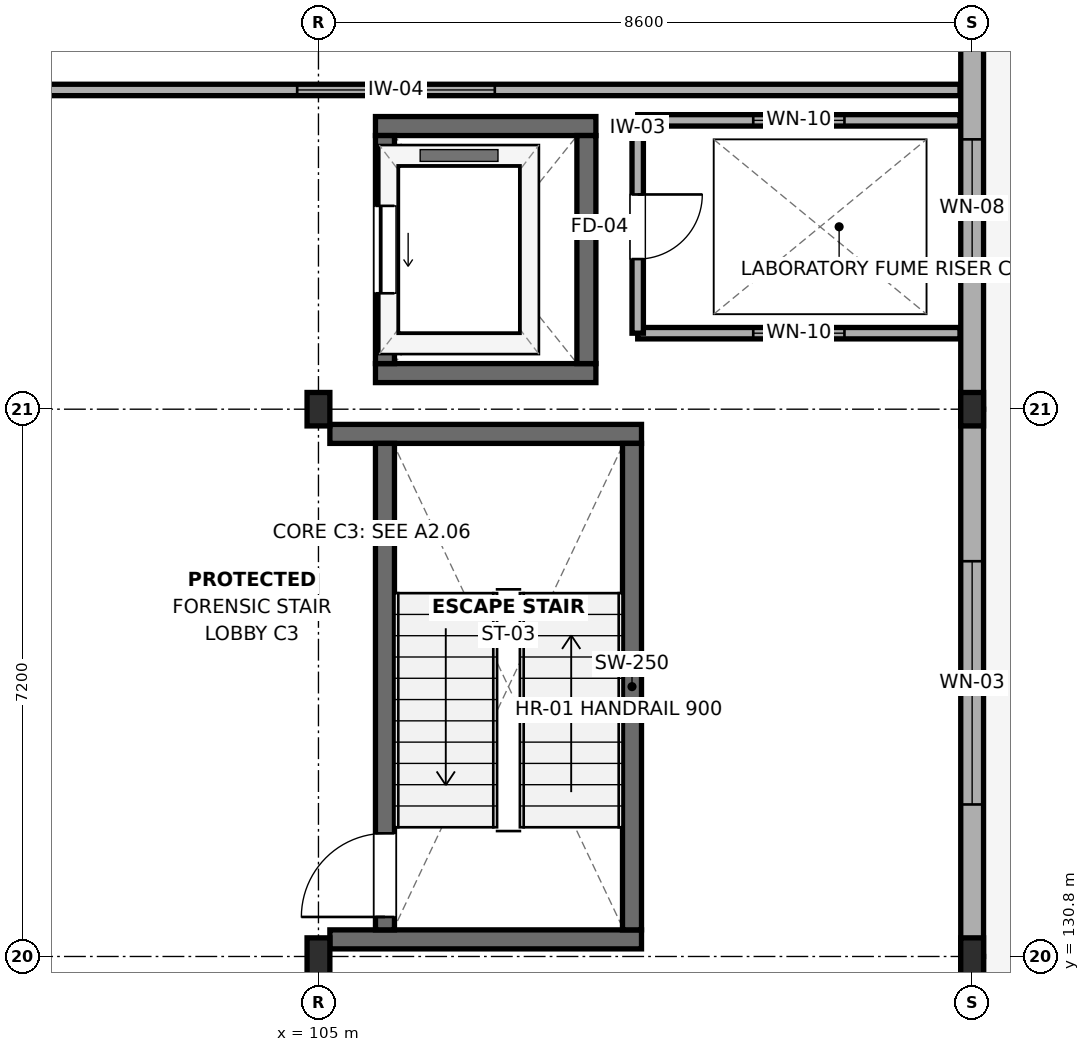
"""IFC4 building model, lengths in metres.
Left out: names, types, materials, properties, quantities, classifications, styles, units other than length and angle.
Written with IfcOpenShell. Run it as: python <this file> out.ifc"""

import sys

from ifc_helpers import new_model, si_unit, direction, frame, frame_2d, origin, origin_2d, place, context, subcontext, project, spatial, rectangle, i_section, extrude, element, fill, save


model = new_model("IFC4")
c1 = context("Model", 3, precision=1e-05, world=origin(), true_north=direction((0.0, 1.0)))
c2 = subcontext(c1, "Body", "Model", "MODEL_VIEW")
j1 = project(units=[si_unit("LENGTHUNIT", "METRE"), si_unit("PLANEANGLEUNIT", "RADIAN")], contexts=[c1])
p1 = place(None, origin())
s1 = spatial("IfcSite", under=j1, at=p1, CompositionType="ELEMENT")
p2 = place(p1, origin())
s2 = spatial("IfcBuilding", under=s1, at=p2, CompositionType="ELEMENT")
p3 = place(p2, frame((0.0, 0.0, 17.1)))
s3 = spatial("IfcBuildingStorey", under=s2, at=p3, CompositionType="ELEMENT", Elevation=17.1)
p4 = place(p3, frame((105.0, 130.8, 0.0), z_axis=(0.0, 0.0, 1.0), x_axis=(1.0, 0.0, 0.0)))
e1 = element("IfcColumn", 1, at=p4, inside=s3, PredefinedType="COLUMN", context=c2, shape_type="SweptSolid", body=[
    extrude(i_section(OverallWidth=0.3, OverallDepth=0.49, WebThickness=0.012, FlangeThickness=0.023, FilletRadius=0.027, at=origin_2d()), origin(), (0.0, 0.0, 1.0), 3.9),
])
p5 = place(p3, frame((105.0, 138.0, 0.0), z_axis=(0.0, 0.0, 1.0), x_axis=(1.0, 0.0, 0.0)))
e2 = element("IfcColumn", 2, at=p5, inside=s3, PredefinedType="COLUMN", context=c2, shape_type="SweptSolid", body=[
    extrude(i_section(OverallWidth=0.3, OverallDepth=0.44, WebThickness=0.011, FlangeThickness=0.021, FilletRadius=0.027, at=origin_2d()), origin(), (0.0, 0.0, 1.0), 3.9),
])
p6 = place(p3, frame((113.6, 130.8, 0.0), z_axis=(0.0, 0.0, 1.0), x_axis=(1.0, 0.0, 0.0)))
e3 = element("IfcColumn", 3, at=p6, inside=s3, PredefinedType="COLUMN", context=c2, shape_type="SweptSolid", body=[
    extrude(i_section(OverallWidth=0.3, OverallDepth=0.49, WebThickness=0.012, FlangeThickness=0.023, FilletRadius=0.027, at=origin_2d()), origin(), (0.0, 0.0, 1.0), 3.9),
])
p7 = place(p3, frame((113.6, 138.0, 0.0), z_axis=(0.0, 0.0, 1.0), x_axis=(1.0, 0.0, 0.0)))
e4 = element("IfcColumn", 4, at=p7, inside=s3, PredefinedType="COLUMN", context=c2, shape_type="SweptSolid", body=[
    extrude(i_section(OverallWidth=0.3, OverallDepth=0.44, WebThickness=0.011, FlangeThickness=0.021, FilletRadius=0.027, at=origin_2d()), origin(), (0.0, 0.0, 1.0), 3.9),
])
for number, where, z_axis, x_axis in (
    (5, (105.15, 131.025, 0.0), (0.0, 0.0, 1.0), (1.0, 0.0, 0.0)),
    (6, (105.15, 137.675, 0.0), (0.0, 0.0, 1.0), (1.0, 0.0, 0.0)),
):
    element("IfcWall", number, at=place(p3, frame(where, z_axis=z_axis, x_axis=x_axis)), inside=s3, PredefinedType="SHEAR", context=c2, shape_type="SweptSolid", body=[
        extrude(rectangle(XDim=4.1, YDim=0.25, at=frame_2d((2.05, 0.0))), origin(), (0.0, 0.0, 1.0), 3.7),
    ])
p8 = place(p3, frame((105.875, 131.15, 0.0), z_axis=(0.0, 0.0, 1.0), x_axis=(0.0, 1.0, 0.0)))
e7 = element("IfcWall", 7, at=p8, inside=s3, PredefinedType="SHEAR", context=c2, shape_type="SweptSolid", body=[
    extrude(rectangle(XDim=6.4, YDim=0.25, at=frame_2d((3.2, 0.0))), origin(), (0.0, 0.0, 1.0), 3.7),
])
p9 = place(p8, frame((0.17, 0.0, 0.0)))
e8 = element("IfcOpeningElement", 8, at=p9, cuts=e7, PredefinedType="OPENING", context=c2, shape_type="SweptSolid", body=[
    extrude(rectangle(XDim=1.1, YDim=2.15, at=frame_2d((0.55, 1.075))), frame((0.0, 0.14, 0.0), z_axis=(0.0, -1.0, 0.0), x_axis=(1.0, 0.0, 0.0)), (0.0, 0.0, 1.0), 0.28),
])
p10 = place(p3, frame((109.125, 131.15, 0.0), z_axis=(0.0, 0.0, 1.0), x_axis=(0.0, 1.0, 0.0)))
e9 = element("IfcWall", 9, at=p10, inside=s3, PredefinedType="SHEAR", context=c2, shape_type="SweptSolid", body=[
    extrude(rectangle(XDim=6.4, YDim=0.25, at=frame_2d((3.2, 0.0))), origin(), (0.0, 0.0, 1.0), 3.7),
])
for number, where, z_axis, x_axis in (
    (10, (105.75, 138.475, 0.0), (0.0, 0.0, 1.0), (1.0, 0.0, 0.0)),
    (11, (105.75, 141.725, 0.0), (0.0, 0.0, 1.0), (1.0, 0.0, 0.0)),
):
    element("IfcWall", number, at=place(p3, frame(where, z_axis=z_axis, x_axis=x_axis)), inside=s3, PredefinedType="SHEAR", context=c2, shape_type="SweptSolid", body=[
        extrude(rectangle(XDim=2.9, YDim=0.25, at=frame_2d((1.45, 0.0))), origin(), (0.0, 0.0, 1.0), 3.7),
    ])
p11 = place(p3, frame((105.875, 138.6, 0.0), z_axis=(0.0, 0.0, 1.0), x_axis=(0.0, 1.0, 0.0)))
e12 = element("IfcWall", 12, at=p11, inside=s3, PredefinedType="SHEAR", context=c2, shape_type="SweptSolid", body=[
    extrude(rectangle(XDim=3.0, YDim=0.25, at=frame_2d((1.5, 0.0))), origin(), (0.0, 0.0, 1.0), 3.7),
])
p12 = place(p11, frame((0.925, 0.0, 0.0)))
e13 = element("IfcOpeningElement", 13, at=p12, cuts=e12, PredefinedType="OPENING", context=c2, shape_type="SweptSolid", body=[
    extrude(rectangle(XDim=1.15, YDim=2.15, at=frame_2d((0.575, 1.075))), frame((0.0, 0.14, 0.0), z_axis=(0.0, -1.0, 0.0), x_axis=(1.0, 0.0, 0.0)), (0.0, 0.0, 1.0), 0.28),
])
p13 = place(p3, frame((108.525, 138.6, 0.0), z_axis=(0.0, 0.0, 1.0), x_axis=(0.0, 1.0, 0.0)))
e14 = element("IfcWall", 14, at=p13, inside=s3, PredefinedType="SHEAR", context=c2, shape_type="SweptSolid", body=[
    extrude(rectangle(XDim=3.0, YDim=0.25, at=frame_2d((1.5, 0.0))), origin(), (0.0, 0.0, 1.0), 3.7),
])
p14 = place(p3, frame((113.6, 122.25, 0.0), z_axis=(0.0, 0.0, 1.0), x_axis=(0.0, 1.0, 0.0)))
e15 = element("IfcWall", 15, at=p14, inside=s3, PredefinedType="SOLIDWALL", context=c2, shape_type="SweptSolid", body=[
    extrude(rectangle(XDim=8.55, YDim=0.3, at=frame_2d((4.275, 0.0))), origin(), (0.0, 0.0, 1.0), 3.345),
])
p15 = place(p14, frame((1.394, 0.0, 0.95)))
e16 = element("IfcOpeningElement", 16, at=p15, cuts=e15, PredefinedType="OPENING", context=c2, shape_type="SweptSolid", body=[
    extrude(rectangle(XDim=2.0, YDim=1.8, at=frame_2d((1.0, 0.9))), frame((0.0, 0.165, 0.0), z_axis=(0.0, -1.0, 0.0), x_axis=(1.0, 0.0, 0.0)), (0.0, 0.0, 1.0), 0.33),
])
p16 = place(p14, frame((5.156, 0.0, 0.95)))
e17 = element("IfcOpeningElement", 17, at=p16, cuts=e15, PredefinedType="OPENING", context=c2, shape_type="SweptSolid", body=[
    extrude(rectangle(XDim=2.0, YDim=1.8, at=frame_2d((1.0, 0.9))), frame((0.0, 0.165, 0.0), z_axis=(0.0, -1.0, 0.0), x_axis=(1.0, 0.0, 0.0)), (0.0, 0.0, 1.0), 0.33),
])
p17 = place(p3, frame((113.6, 130.8, 0.0), z_axis=(0.0, 0.0, 1.0), x_axis=(0.0, 1.0, 0.0)))
e18 = element("IfcWall", 18, at=p17, inside=s3, PredefinedType="SOLIDWALL", context=c2, shape_type="SweptSolid", body=[
    extrude(rectangle(XDim=7.2, YDim=0.3, at=frame_2d((3.6, 0.0))), origin(), (0.0, 0.0, 1.0), 3.345),
])
p18 = place(p17, frame((2.0, 0.0, 0.95)))
e19 = element("IfcOpeningElement", 19, at=p18, cuts=e18, PredefinedType="OPENING", context=c2, shape_type="SweptSolid", body=[
    extrude(rectangle(XDim=3.2, YDim=2.2, at=frame_2d((1.6, 1.1))), frame((0.0, 0.165, 0.0), z_axis=(0.0, -1.0, 0.0), x_axis=(1.0, 0.0, 0.0)), (0.0, 0.0, 1.0), 0.33),
])
p19 = place(p3, frame((113.6, 138.0, 0.0), z_axis=(0.0, 0.0, 1.0), x_axis=(0.0, 1.0, 0.0)))
e20 = element("IfcWall", 20, at=p19, inside=s3, PredefinedType="SOLIDWALL", context=c2, shape_type="SweptSolid", body=[
    extrude(rectangle(XDim=7.2, YDim=0.3, at=frame_2d((3.6, 0.0))), origin(), (0.0, 0.0, 1.0), 3.095),
])
p20 = place(p19, frame((1.75, 0.0, 0.65)))
e21 = element("IfcOpeningElement", 21, at=p20, cuts=e20, PredefinedType="OPENING", context=c2, shape_type="SweptSolid", body=[
    extrude(rectangle(XDim=1.8, YDim=1.2, at=frame_2d((0.9, 0.6))), frame((0.0, 0.165, 0.0), z_axis=(0.0, -1.0, 0.0), x_axis=(1.0, 0.0, 0.0)), (0.0, 0.0, 1.0), 0.33),
])
p21 = place(p3, frame((109.2, 139.0, 0.0), z_axis=(0.0, 0.0, 1.0), x_axis=(1.0, 0.0, 0.0)))
e22 = element("IfcWall", 22, at=p21, inside=s3, PredefinedType="PARTITIONING", context=c2, shape_type="SweptSolid", body=[
    extrude(rectangle(XDim=4.24, YDim=0.15, at=frame_2d((2.12, 0.0))), origin(), (0.0, 0.0, 1.0), 3.365),
])
p22 = place(p21, frame((1.52, 0.0, 0.95)))
e23 = element("IfcOpeningElement", 23, at=p22, cuts=e22, PredefinedType="OPENING", context=c2, shape_type="SweptSolid", body=[
    extrude(rectangle(XDim=1.2, YDim=1.5, at=frame_2d((0.6, 0.75))), frame((0.0, 0.09, 0.0), z_axis=(0.0, -1.0, 0.0), x_axis=(1.0, 0.0, 0.0)), (0.0, 0.0, 1.0), 0.18),
])
p23 = place(p3, frame((109.2, 141.8, 0.0), z_axis=(0.0, 0.0, 1.0), x_axis=(1.0, 0.0, 0.0)))
e24 = element("IfcWall", 24, at=p23, inside=s3, PredefinedType="PARTITIONING", context=c2, shape_type="SweptSolid", body=[
    extrude(rectangle(XDim=4.24, YDim=0.15, at=frame_2d((2.12, 0.0))), origin(), (0.0, 0.0, 1.0), 3.365),
])
p24 = place(p23, frame((1.52, 0.0, 0.95)))
e25 = element("IfcOpeningElement", 25, at=p24, cuts=e24, PredefinedType="OPENING", context=c2, shape_type="SweptSolid", body=[
    extrude(rectangle(XDim=1.2, YDim=1.5, at=frame_2d((0.6, 0.75))), frame((0.0, 0.09, 0.0), z_axis=(0.0, -1.0, 0.0), x_axis=(1.0, 0.0, 0.0)), (0.0, 0.0, 1.0), 0.18),
])
p25 = place(p3, frame((109.2, 139.0, 0.0), z_axis=(0.0, 0.0, 1.0), x_axis=(0.0, 1.0, 0.0)))
e26 = element("IfcWall", 26, at=p25, inside=s3, PredefinedType="PARTITIONING", context=c2, shape_type="SweptSolid", body=[
    extrude(rectangle(XDim=2.8, YDim=0.15, at=frame_2d((1.4, 0.0))), origin(), (0.0, 0.0, 1.0), 3.695),
])
p26 = place(p25, frame((0.975, 0.0, 0.0)))
e27 = element("IfcOpeningElement", 27, at=p26, cuts=e26, PredefinedType="OPENING", context=c2, shape_type="SweptSolid", body=[
    extrude(rectangle(XDim=0.85, YDim=2.1, at=frame_2d((0.425, 1.05))), frame((0.0, 0.09, 0.0), z_axis=(0.0, -1.0, 0.0), x_axis=(1.0, 0.0, 0.0)), (0.0, 0.0, 1.0), 0.18),
])
p27 = place(p3, frame((98.6, 142.2, 0.0), z_axis=(0.0, 0.0, 1.0), x_axis=(1.0, 0.0, 0.0)))
e28 = element("IfcWall", 28, at=p27, inside=s3, PredefinedType="PARTITIONING", context=c2, shape_type="SweptSolid", body=[
    extrude(rectangle(XDim=14.84, YDim=0.15, at=frame_2d((7.42, 0.0))), origin(), (0.0, 0.0, 1.0), 3.365),
])
p28 = place(p27, frame((6.12, 0.0, 0.95)))
e29 = element("IfcOpeningElement", 29, at=p28, cuts=e28, PredefinedType="OPENING", context=c2, shape_type="SweptSolid", body=[
    extrude(rectangle(XDim=2.6, YDim=1.5, at=frame_2d((1.3, 0.75))), frame((0.0, 0.09, 0.0), z_axis=(0.0, -1.0, 0.0), x_axis=(1.0, 0.0, 0.0)), (0.0, 0.0, 1.0), 0.18),
])
p29 = place(p18, origin())
e30 = element("IfcWindow", 30, at=p29, inside=s3, PartitioningType="SINGLE_PANEL", PredefinedType="WINDOW", context=c2, shape_type="SweptSolid", body=[
    extrude(rectangle(XDim=3.2, YDim=2.2, at=frame_2d((1.6, 1.1))), frame((0.0, 0.03, 0.0), z_axis=(0.0, -1.0, 0.0), x_axis=(1.0, 0.0, 0.0)), (0.0, 0.0, 1.0), 0.06),
])
fill(e19, e30)
p30 = place(p20, origin())
e31 = element("IfcWindow", 31, at=p30, inside=s3, PartitioningType="SINGLE_PANEL", PredefinedType="WINDOW", context=c2, shape_type="SweptSolid", body=[
    extrude(rectangle(XDim=1.8, YDim=1.2, at=frame_2d((0.9, 0.6))), frame((0.0, 0.03, 0.0), z_axis=(0.0, -1.0, 0.0), x_axis=(1.0, 0.0, 0.0)), (0.0, 0.0, 1.0), 0.06),
])
fill(e21, e31)
p31 = place(p9, origin())
e32 = element("IfcDoor", 32, at=p31, inside=s3, OperationType="SINGLE_SWING_LEFT", PredefinedType="DOOR", context=c2, shape_type="SweptSolid", body=[
    extrude(rectangle(XDim=1.1, YDim=2.15, at=frame_2d((0.55, 1.075))), frame((0.0, 0.025, 0.0), z_axis=(0.0, -1.0, 0.0), x_axis=(1.0, 0.0, 0.0)), (0.0, 0.0, 1.0), 0.05),
])
fill(e8, e32)
p32 = place(p12, origin())
e33 = element("IfcDoor", 33, at=p32, inside=s3, OperationType="SLIDING_TO_LEFT", PredefinedType="DOOR", context=c2, shape_type="SweptSolid", body=[
    extrude(rectangle(XDim=1.15, YDim=2.15, at=frame_2d((0.575, 1.075))), frame((0.0, 0.025, 0.0), z_axis=(0.0, -1.0, 0.0), x_axis=(1.0, 0.0, 0.0)), (0.0, 0.0, 1.0), 0.05),
])
fill(e13, e33)
p33 = place(p22, origin())
e34 = element("IfcWindow", 34, at=p33, inside=s3, PartitioningType="SINGLE_PANEL", PredefinedType="WINDOW", context=c2, shape_type="SweptSolid", body=[
    extrude(rectangle(XDim=1.2, YDim=1.5, at=frame_2d((0.6, 0.75))), frame((0.0, 0.03, 0.0), z_axis=(0.0, -1.0, 0.0), x_axis=(1.0, 0.0, 0.0)), (0.0, 0.0, 1.0), 0.06),
])
fill(e23, e34)
p34 = place(p24, origin())
e35 = element("IfcWindow", 35, at=p34, inside=s3, PartitioningType="SINGLE_PANEL", PredefinedType="WINDOW", context=c2, shape_type="SweptSolid", body=[
    extrude(rectangle(XDim=1.2, YDim=1.5, at=frame_2d((0.6, 0.75))), frame((0.0, 0.03, 0.0), z_axis=(0.0, -1.0, 0.0), x_axis=(1.0, 0.0, 0.0)), (0.0, 0.0, 1.0), 0.06),
])
fill(e25, e35)
p35 = place(p26, frame((0.85, 0.0, 0.0), z_axis=(0.0, 0.0, 1.0), x_axis=(-1.0, 0.0, 0.0)))
e36 = element("IfcDoor", 36, at=p35, inside=s3, OperationType="SINGLE_SWING_LEFT", PredefinedType="DOOR", context=c2, shape_type="SweptSolid", body=[
    extrude(rectangle(XDim=0.85, YDim=2.1, at=frame_2d((0.425, 1.05))), frame((0.0, 0.025, 0.0), z_axis=(0.0, -1.0, 0.0), x_axis=(1.0, 0.0, 0.0)), (0.0, 0.0, 1.0), 0.05),
])
fill(e27, e36)
p36 = place(p28, origin())
e37 = element("IfcWindow", 37, at=p36, inside=s3, PartitioningType="SINGLE_PANEL", PredefinedType="WINDOW", context=c2, shape_type="SweptSolid", body=[
    extrude(rectangle(XDim=2.6, YDim=1.5, at=frame_2d((1.3, 0.75))), frame((0.0, 0.03, 0.0), z_axis=(0.0, -1.0, 0.0), x_axis=(1.0, 0.0, 0.0)), (0.0, 0.0, 1.0), 0.06),
])
fill(e29, e37)
save(model, sys.argv[1])
